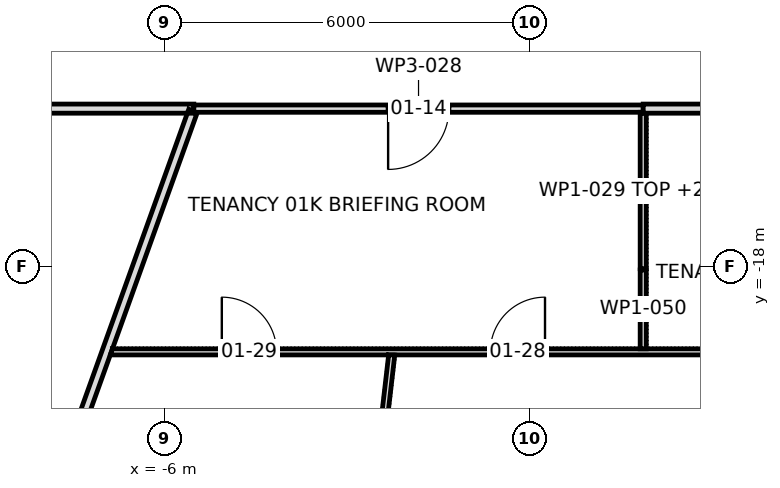
"""IFC4 building model, lengths in metres.
Left out: names, types, materials, properties, quantities, classifications, styles, units other than length and angle.
Written with IfcOpenShell. Run it as: python <this file> out.ifc"""

import sys

from ifc_helpers import new_model, si_unit, direction, frame, frame_2d, origin, place, context, subcontext, project, spatial, polyline, rectangle, outline, extrude, element, fill, save


model = new_model("IFC4")
c1 = context("Model", 3, precision=1e-05, world=origin(), true_north=direction((0.0, 1.0)))
c2 = subcontext(c1, "Body", "Model", "MODEL_VIEW")
j1 = project(units=[si_unit("LENGTHUNIT", "METRE"), si_unit("PLANEANGLEUNIT", "RADIAN")], contexts=[c1])
p1 = place(None, origin())
s1 = spatial("IfcSite", under=j1, at=p1, CompositionType="ELEMENT")
p2 = place(p1, origin())
s2 = spatial("IfcBuilding", under=s1, at=p2, CompositionType="ELEMENT")
p3 = place(p2, frame((0.0, 0.0, 27.7)))
s3 = spatial("IfcBuildingStorey", under=s2, at=p3, CompositionType="ELEMENT", Elevation=27.7)
p4 = place(p3, frame((-10.219, -28.49, 0.0), z_axis=(0.0, 0.0, 1.0), x_axis=(0.337910330096, 0.941178308725, 0.0)))
e1 = element("IfcWall", 1, at=p4, inside=s3, PredefinedType="PARTITIONING", context=c2, shape_type="SweptSolid", body=[
    extrude(outline(polyline([(0.014, -0.075), (1.958, -0.075), (3.902, -0.075), (5.845, -0.075), (7.789, -0.075), (9.733, -0.075), (9.737, -0.073), (9.738, -0.075), (11.115, -0.075), (12.493, -0.075), (13.871, -0.075), (13.871, -0.075), (13.853, -0.024), (13.853, -0.024), (13.851, -0.02), (13.837, -0.025), (13.801, 0.075), (11.829, 0.075), (9.858, 0.075), (7.886, 0.075), (5.915, 0.075), (3.943, 0.075), (1.972, 0.075), (0.0, 0.075), (0.0, 0.066), (0.0, -0.001), (0.014, -0.075)])), origin(), (0.0, 0.0, 1.0), 2.91),
])
p5 = place(p3, frame((-6.894, -19.4, 0.0), z_axis=(0.0, 0.0, 1.0), x_axis=(1.0, 0.0, 0.0)))
e2 = element("IfcWall", 2, at=p5, inside=s3, PredefinedType="PARTITIONING", context=c2, shape_type="SweptSolid", body=[
    extrude(outline(polyline([(0.0, -0.05), (1.526, -0.05), (3.052, -0.05), (4.578, -0.05), (4.578, -0.049), (4.587, -0.05), (6.454, -0.05), (8.321, -0.05), (10.188, -0.05), (12.055, -0.05), (13.922, -0.05), (13.925, -0.049), (13.925, -0.05), (15.696, -0.05), (17.468, -0.05), (19.239, -0.05), (19.243, -0.047), (19.245, -0.05), (20.848, -0.05), (22.451, -0.05), (24.054, -0.05), (25.657, -0.05), (25.657, -0.05), (25.614, -0.005), (25.614, -0.005), (25.561, 0.05), (23.819, 0.05), (22.076, 0.05), (20.334, 0.05), (18.591, 0.05), (16.849, 0.05), (15.106, 0.05), (13.364, 0.05), (13.364, 0.05), (13.264, 0.05), (13.264, 0.05), (11.781, 0.05), (10.297, 0.05), (8.814, 0.05), (8.814, 0.05), (8.714, 0.05), (8.714, 0.05), (6.978, 0.05), (5.243, 0.05), (3.507, 0.05), (1.771, 0.05), (0.036, 0.05), (0.0, -0.049), (0.0, -0.05)])), origin(), (0.0, 0.0, 1.0), 3.9),
])
p6 = place(p5, frame((6.249, 0.0, 0.0)))
e3 = element("IfcOpeningElement", 3, at=p6, cuts=e2, PredefinedType="OPENING", context=c2, shape_type="SweptSolid", body=[
    extrude(rectangle(XDim=0.9, YDim=2.1, at=frame_2d((0.45, 1.05))), frame((0.0, 0.062, 0.0), z_axis=(0.0, -1.0, 0.0), x_axis=(1.0, 0.0, 0.0)), (0.0, 0.0, 1.0), 0.124),
])
p7 = place(p5, frame((1.834, 0.0, 0.0)))
e4 = element("IfcOpeningElement", 4, at=p7, cuts=e2, PredefinedType="OPENING", context=c2, shape_type="SweptSolid", body=[
    extrude(rectangle(XDim=0.9, YDim=2.1, at=frame_2d((0.45, 1.05))), frame((0.0, 0.062, 0.0), z_axis=(0.0, -1.0, 0.0), x_axis=(1.0, 0.0, 0.0)), (0.0, 0.0, 1.0), 0.124),
])
p8 = place(p3, frame((-5.52, -15.4, 0.0), z_axis=(0.0, 0.0, 1.0), x_axis=(-1.0, 0.0, 0.0)))
e5 = element("IfcWall", 5, at=p8, inside=s3, PredefinedType="PARTITIONING", context=c2, shape_type="SweptSolid", body=[
    extrude(outline(polyline([(0.0, -0.075), (1.964, -0.075), (3.928, -0.075), (5.892, -0.075), (7.856, -0.075), (9.82, -0.075), (9.82, -0.06), (9.42, -0.06), (9.42, 0.045), (9.389, 0.075), (7.532, 0.075), (5.676, 0.075), (3.82, 0.075), (1.963, 0.075), (0.106, 0.075), (0.083, 0.01), (0.0, 0.039), (0.0, -0.075)])), origin(), (0.0, 0.0, 1.0), 3.9),
])
p9 = place(p8, frame((4.21, 0.0, 0.0)))
e6 = element("IfcOpeningElement", 6, at=p9, cuts=e5, PredefinedType="OPENING", context=c2, shape_type="SweptSolid", body=[
    extrude(rectangle(XDim=1.0, YDim=2.1, at=frame_2d((0.5, 1.05))), frame((0.0, 0.087, 0.0), z_axis=(0.0, -1.0, 0.0), x_axis=(1.0, 0.0, 0.0)), (0.0, 0.0, 1.0), 0.174),
])
p10 = place(p3, frame((-3.445, -29.626, 0.0), z_axis=(0.0, 0.0, 1.0), x_axis=(0.115096942751, 0.993354263981, 0.0)))
e7 = element("IfcWall", 7, at=p10, inside=s3, PredefinedType="PARTITIONING", context=c2, shape_type="SweptSolid", body=[
    extrude(outline(polyline([(10.25, -0.05), (10.25, -0.047), (10.238, 0.05), (8.532, 0.05), (6.825, 0.05), (5.119, 0.05), (3.413, 0.05), (1.706, 0.05), (0.0, 0.05), (0.0, -0.018), (0.004, -0.05), (1.711, -0.05), (3.419, -0.05), (5.127, -0.05), (6.834, -0.05), (8.542, -0.05), (10.25, -0.05)])), origin(), (0.0, 0.0, 1.0), 2.91),
])
p11 = place(p3, frame((1.87, -15.4, 0.0), z_axis=(0.0, 0.0, 1.0), x_axis=(-1.0, 0.0, 0.0)))
e8 = element("IfcWall", 8, at=p11, inside=s3, PredefinedType="PARTITIONING", context=c2, shape_type="SweptSolid", body=[
    extrude(rectangle(XDim=7.39, YDim=0.12, at=frame_2d((3.695, 0.0))), origin(), (0.0, 0.0, 1.0), 3.9),
])
p12 = place(p11, frame((3.195, 0.0, 0.0)))
e9 = element("IfcOpeningElement", 9, at=p12, cuts=e8, PredefinedType="OPENING", context=c2, shape_type="SweptSolid", body=[
    extrude(rectangle(XDim=1.0, YDim=2.1, at=frame_2d((0.5, 1.05))), frame((0.0, 0.072, 0.0), z_axis=(0.0, -1.0, 0.0), x_axis=(1.0, 0.0, 0.0)), (0.0, 0.0, 1.0), 0.144),
])
p13 = place(p3, frame((1.87, -15.46, 0.0), z_axis=(0.0, 0.0, 1.0), x_axis=(0.0, -1.0, 0.0)))
e10 = element("IfcWall", 10, at=p13, inside=s3, PredefinedType="PARTITIONING", context=c2, shape_type="SweptSolid", body=[
    extrude(outline(polyline([(2.583, 0.05), (1.299, 0.05), (0.015, 0.05), (0.015, 0.0), (0.0, 0.0), (0.0, -0.05), (1.291, -0.05), (2.583, -0.05), (2.583, 0.05)])), origin(), (0.0, 0.0, 1.0), 2.91),
])
p14 = place(p3, frame((1.87, -15.4, 0.0), z_axis=(0.0, 0.0, 1.0), x_axis=(1.0, 0.0, 0.0)))
e11 = element("IfcWall", 11, at=p14, inside=s3, PredefinedType="PARTITIONING", context=c2, shape_type="SweptSolid", body=[
    extrude(outline(polyline([(0.0, -0.075), (1.944, -0.075), (3.887, -0.075), (5.831, -0.075), (7.774, -0.075), (9.718, -0.075), (11.661, -0.075), (13.605, -0.075), (13.455, 0.075), (11.533, 0.075), (9.611, 0.075), (7.688, 0.075), (5.766, 0.075), (3.844, 0.075), (1.922, 0.075), (0.0, 0.075), (0.0, -0.075)])), origin(), (0.0, 0.0, 1.0), 3.9),
])
p15 = place(p14, frame((1.775, 0.0, 0.0)))
e12 = element("IfcOpeningElement", 12, at=p15, cuts=e11, PredefinedType="OPENING", context=c2, shape_type="SweptSolid", body=[
    extrude(rectangle(XDim=1.0, YDim=2.1, at=frame_2d((0.5, 1.05))), frame((0.0, 0.087, 0.0), z_axis=(0.0, -1.0, 0.0), x_axis=(1.0, 0.0, 0.0)), (0.0, 0.0, 1.0), 0.174),
])
p16 = place(p14, frame((8.31, 0.0, 0.0)))
e13 = element("IfcOpeningElement", 13, at=p16, cuts=e11, PredefinedType="OPENING", context=c2, shape_type="SweptSolid", body=[
    extrude(rectangle(XDim=1.0, YDim=2.1, at=frame_2d((0.5, 1.05))), frame((0.0, 0.087, 0.0), z_axis=(0.0, -1.0, 0.0), x_axis=(1.0, 0.0, 0.0)), (0.0, 0.0, 1.0), 0.174),
])
p17 = place(p3, frame((1.87, -18.043, 0.0), z_axis=(0.0, 0.0, 1.0), x_axis=(0.0, -1.0, 0.0)))
e14 = element("IfcWall", 14, at=p17, inside=s3, PredefinedType="PARTITIONING", context=c2, shape_type="SweptSolid", body=[
    extrude(outline(polyline([(0.0, -0.05), (1.307, -0.05), (1.307, 0.05), (0.0, 0.05), (0.0, -0.05)])), origin(), (0.0, 0.0, 1.0), 3.9),
])
p18 = place(p12, origin())
e15 = element("IfcDoor", 15, at=p18, inside=s3, OperationType="SINGLE_SWING_LEFT", PredefinedType="DOOR", context=c2, shape_type="SweptSolid", body=[
    extrude(rectangle(XDim=1.0, YDim=2.1, at=frame_2d((0.5, 1.05))), frame((0.0, 0.025, 0.0), z_axis=(0.0, -1.0, 0.0), x_axis=(1.0, 0.0, 0.0)), (0.0, 0.0, 1.0), 0.05),
])
fill(e9, e15)
p19 = place(p6, origin())
e16 = element("IfcDoor", 16, at=p19, inside=s3, OperationType="SINGLE_SWING_LEFT", PredefinedType="DOOR", context=c2, shape_type="SweptSolid", body=[
    extrude(rectangle(XDim=0.9, YDim=2.1, at=frame_2d((0.45, 1.05))), frame((0.0, 0.025, 0.0), z_axis=(0.0, -1.0, 0.0), x_axis=(1.0, 0.0, 0.0)), (0.0, 0.0, 1.0), 0.05),
])
fill(e3, e16)
p20 = place(p7, origin())
e17 = element("IfcDoor", 17, at=p20, inside=s3, OperationType="SINGLE_SWING_RIGHT", PredefinedType="DOOR", context=c2, shape_type="SweptSolid", body=[
    extrude(rectangle(XDim=0.9, YDim=2.1, at=frame_2d((0.45, 1.05))), frame((0.0, 0.025, 0.0), z_axis=(0.0, -1.0, 0.0), x_axis=(1.0, 0.0, 0.0)), (0.0, 0.0, 1.0), 0.05),
])
fill(e4, e17)
save(model, sys.argv[1])
